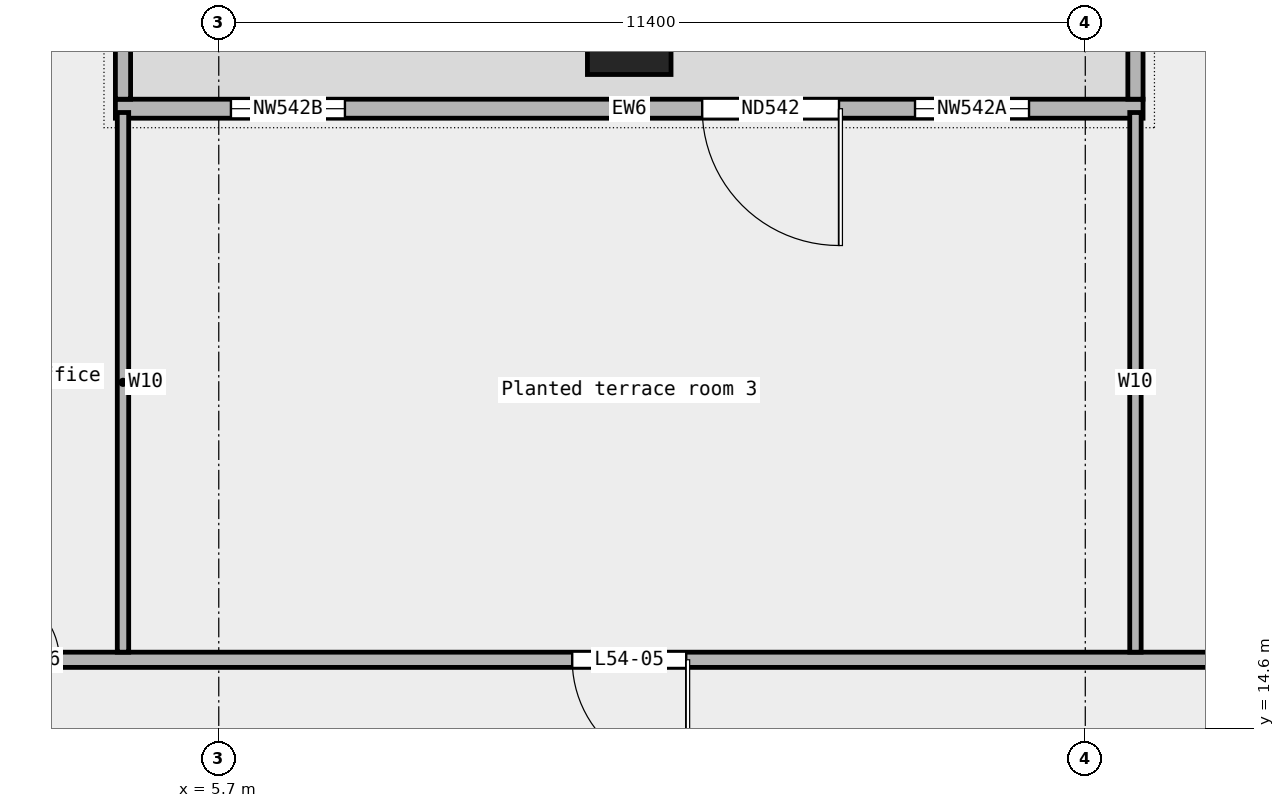
"""IFC4 building model, lengths in metres.
Left out: names, types, materials, properties, quantities, classifications, styles, units other than length and angle.
Written with IfcOpenShell. Run it as: python <this file> out.ifc"""

import sys

from ifc_helpers import new_model, si_unit, direction, frame, frame_2d, origin, origin_2d, place, context, subcontext, project, spatial, rectangle, extrude, element, fill, save


model = new_model("IFC4")
c1 = context("Model", 3, precision=1e-05, world=origin(), true_north=direction((0.0, 1.0)))
c2 = subcontext(c1, "Body", "Model", "MODEL_VIEW")
j1 = project(units=[si_unit("LENGTHUNIT", "METRE"), si_unit("PLANEANGLEUNIT", "RADIAN")], contexts=[c1])
p1 = place(None, origin())
s1 = spatial("IfcSite", under=j1, at=p1, CompositionType="ELEMENT")
p2 = place(p1, origin())
s2 = spatial("IfcBuilding", under=s1, at=p2, CompositionType="ELEMENT")
p3 = place(p2, frame((0.0, 0.0, 251.0)))
s3 = spatial("IfcBuildingStorey", under=s2, at=p3, CompositionType="ELEMENT", Elevation=251.0)
p4 = place(p3, frame((11.1, 23.75, 0.0), z_axis=(0.0, 0.0, 1.0), x_axis=(1.0, 0.0, 0.0)))
e1 = element("IfcColumn", 1, at=p4, inside=s3, PredefinedType="COLUMN", context=c2, shape_type="SweptSolid", body=[
    extrude(rectangle(XDim=1.1, YDim=1.1, at=origin_2d()), origin(), (0.0, 0.0, 1.0), 3.6),
])
p5 = place(p3, frame((17.86, 22.75, 0.0), z_axis=(0.0, 0.0, 1.0), x_axis=(-1.0, 0.0, 0.0)))
e2 = element("IfcWall", 2, at=p5, inside=s3, PredefinedType="STANDARD", context=c2, shape_type="SweptSolid", body=[
    extrude(rectangle(XDim=13.52, YDim=0.25, at=frame_2d((6.76, 0.0))), origin(), (0.0, 0.0, 1.0), 3.6),
])
p6 = place(p5, frame((1.5, 0.0, 0.45)))
e3 = element("IfcOpeningElement", 3, at=p6, cuts=e2, PredefinedType="OPENING", context=c2, shape_type="SweptSolid", body=[
    extrude(rectangle(XDim=1.5, YDim=2.4, at=frame_2d((0.75, 1.2))), frame((0.0, 0.137, 0.0), z_axis=(0.0, -1.0, 0.0), x_axis=(1.0, 0.0, 0.0)), (0.0, 0.0, 1.0), 0.274),
])
p7 = place(p5, frame((4.0, 0.0, 0.0)))
e4 = element("IfcOpeningElement", 4, at=p7, cuts=e2, PredefinedType="OPENING", context=c2, shape_type="SweptSolid", body=[
    extrude(rectangle(XDim=1.8, YDim=2.4, at=frame_2d((0.9, 1.2))), frame((0.0, 0.137, 0.0), z_axis=(0.0, -1.0, 0.0), x_axis=(1.0, 0.0, 0.0)), (0.0, 0.0, 1.0), 0.274),
])
p8 = place(p5, frame((10.5, 0.0, 0.45)))
e5 = element("IfcOpeningElement", 5, at=p8, cuts=e2, PredefinedType="OPENING", context=c2, shape_type="SweptSolid", body=[
    extrude(rectangle(XDim=1.5, YDim=2.4, at=frame_2d((0.75, 1.2))), frame((0.0, 0.137, 0.0), z_axis=(0.0, -1.0, 0.0), x_axis=(1.0, 0.0, 0.0)), (0.0, 0.0, 1.0), 0.274),
])
for number, where, z_axis, x_axis in (
    (6, (17.76, 24.75, 0.0), (0.0, 0.0, 1.0), (0.0, -1.0, 0.0)),
    (7, (4.44, 24.75, 0.0), (0.0, 0.0, 1.0), (0.0, -1.0, 0.0)),
):
    element("IfcWall", number, at=place(p3, frame(where, z_axis=z_axis, x_axis=x_axis)), inside=s3, PredefinedType="STANDARD", context=c2, shape_type="SweptSolid", body=[
        extrude(rectangle(XDim=1.875, YDim=0.2, at=frame_2d((0.938, 0.0))), origin(), (0.0, 0.0, 1.0), 3.6),
    ])
p9 = place(p3, frame((-28.15, 15.5, 0.0), z_axis=(0.0, 0.0, 1.0), x_axis=(1.0, 0.0, 0.0)))
e8 = element("IfcWall", 8, at=p9, inside=s3, PredefinedType="PARTITIONING", context=c2, shape_type="SweptSolid", body=[
    extrude(rectangle(XDim=56.3, YDim=0.2, at=frame_2d((28.15, 0.0))), origin(), (0.0, 0.0, 1.0), 3.6),
])
p10 = place(p9, frame((50.405, 0.0, 0.0)))
e9 = element("IfcOpeningElement", 9, at=p10, cuts=e8, PredefinedType="OPENING", context=c2, shape_type="SweptSolid", body=[
    extrude(rectangle(XDim=1.2, YDim=2.1, at=frame_2d((0.6, 1.05))), frame((0.0, 0.112, 0.0), z_axis=(0.0, -1.0, 0.0), x_axis=(1.0, 0.0, 0.0)), (0.0, 0.0, 1.0), 0.224),
])
p11 = place(p9, frame((38.5, 0.0, 0.0)))
e10 = element("IfcOpeningElement", 10, at=p11, cuts=e8, PredefinedType="OPENING", context=c2, shape_type="SweptSolid", body=[
    extrude(rectangle(XDim=1.5, YDim=2.1, at=frame_2d((0.75, 1.05))), frame((0.0, 0.112, 0.0), z_axis=(0.0, -1.0, 0.0), x_axis=(1.0, 0.0, 0.0)), (0.0, 0.0, 1.0), 0.224),
])
p12 = place(p9, frame((30.853, 0.0, 0.0)))
e11 = element("IfcOpeningElement", 11, at=p12, cuts=e8, PredefinedType="OPENING", context=c2, shape_type="SweptSolid", body=[
    extrude(rectangle(XDim=0.9, YDim=2.1, at=frame_2d((0.45, 1.05))), frame((0.0, 0.112, 0.0), z_axis=(0.0, -1.0, 0.0), x_axis=(1.0, 0.0, 0.0)), (0.0, 0.0, 1.0), 0.224),
])
p13 = place(p9, frame((19.798, 0.0, 0.0)))
e12 = element("IfcOpeningElement", 12, at=p13, cuts=e8, PredefinedType="OPENING", context=c2, shape_type="SweptSolid", body=[
    extrude(rectangle(XDim=1.8, YDim=2.1, at=frame_2d((0.9, 1.05))), frame((0.0, 0.112, 0.0), z_axis=(0.0, -1.0, 0.0), x_axis=(1.0, 0.0, 0.0)), (0.0, 0.0, 1.0), 0.224),
])
p14 = place(p9, frame((5.04, 0.0, 0.0)))
e13 = element("IfcOpeningElement", 13, at=p14, cuts=e8, PredefinedType="OPENING", context=c2, shape_type="SweptSolid", body=[
    extrude(rectangle(XDim=1.5, YDim=2.1, at=frame_2d((0.75, 1.05))), frame((0.0, 0.112, 0.0), z_axis=(0.0, -1.0, 0.0), x_axis=(1.0, 0.0, 0.0)), (0.0, 0.0, 1.0), 0.224),
])
for number, where, z_axis, x_axis in (
    (14, (4.44, 15.6, 0.0), (0.0, 0.0, 1.0), (0.0, 1.0, 0.0)),
    (15, (17.76, 15.6, 0.0), (0.0, 0.0, 1.0), (0.0, 1.0, 0.0)),
):
    element("IfcWall", number, at=place(p3, frame(where, z_axis=z_axis, x_axis=x_axis)), inside=s3, PredefinedType="PARTITIONING", context=c2, shape_type="SweptSolid", body=[
        extrude(rectangle(XDim=7.1, YDim=0.15, at=frame_2d((3.55, 0.0))), origin(), (0.0, 0.0, 1.0), 3.6),
    ])
p15 = place(p6, origin())
e16 = element("IfcWindow", 16, at=p15, inside=s3, PartitioningType="SINGLE_PANEL", PredefinedType="WINDOW", context=c2, shape_type="SweptSolid", body=[
    extrude(rectangle(XDim=1.5, YDim=2.4, at=frame_2d((0.75, 1.2))), frame((0.0, 0.03, 0.0), z_axis=(0.0, -1.0, 0.0), x_axis=(1.0, 0.0, 0.0)), (0.0, 0.0, 1.0), 0.06),
])
fill(e3, e16)
p16 = place(p7, origin())
e17 = element("IfcDoor", 17, at=p16, inside=s3, OperationType="DOUBLE_DOOR_SINGLE_SWING", PredefinedType="DOOR", context=c2, shape_type="SweptSolid", body=[
    extrude(rectangle(XDim=1.8, YDim=2.4, at=frame_2d((0.9, 1.2))), frame((0.0, 0.025, 0.0), z_axis=(0.0, -1.0, 0.0), x_axis=(1.0, 0.0, 0.0)), (0.0, 0.0, 1.0), 0.05),
])
fill(e4, e17)
p17 = place(p8, origin())
e18 = element("IfcWindow", 18, at=p17, inside=s3, PartitioningType="SINGLE_PANEL", PredefinedType="WINDOW", context=c2, shape_type="SweptSolid", body=[
    extrude(rectangle(XDim=1.5, YDim=2.4, at=frame_2d((0.75, 1.2))), frame((0.0, 0.03, 0.0), z_axis=(0.0, -1.0, 0.0), x_axis=(1.0, 0.0, 0.0)), (0.0, 0.0, 1.0), 0.06),
])
fill(e5, e18)
p18 = place(p11, origin())
e19 = element("IfcDoor", 19, at=p18, inside=s3, OperationType="DOUBLE_DOOR_SINGLE_SWING", PredefinedType="DOOR", context=c2, shape_type="SweptSolid", body=[
    extrude(rectangle(XDim=1.5, YDim=2.1, at=frame_2d((0.75, 1.05))), frame((0.0, 0.025, 0.0), z_axis=(0.0, -1.0, 0.0), x_axis=(1.0, 0.0, 0.0)), (0.0, 0.0, 1.0), 0.05),
])
fill(e10, e19)
p19 = place(p12, origin())
e20 = element("IfcDoor", 20, at=p19, inside=s3, OperationType="SINGLE_SWING_LEFT", PredefinedType="DOOR", context=c2, shape_type="SweptSolid", body=[
    extrude(rectangle(XDim=0.9, YDim=2.1, at=frame_2d((0.45, 1.05))), frame((0.0, 0.025, 0.0), z_axis=(0.0, -1.0, 0.0), x_axis=(1.0, 0.0, 0.0)), (0.0, 0.0, 1.0), 0.05),
])
fill(e11, e20)
save(model, sys.argv[1])
